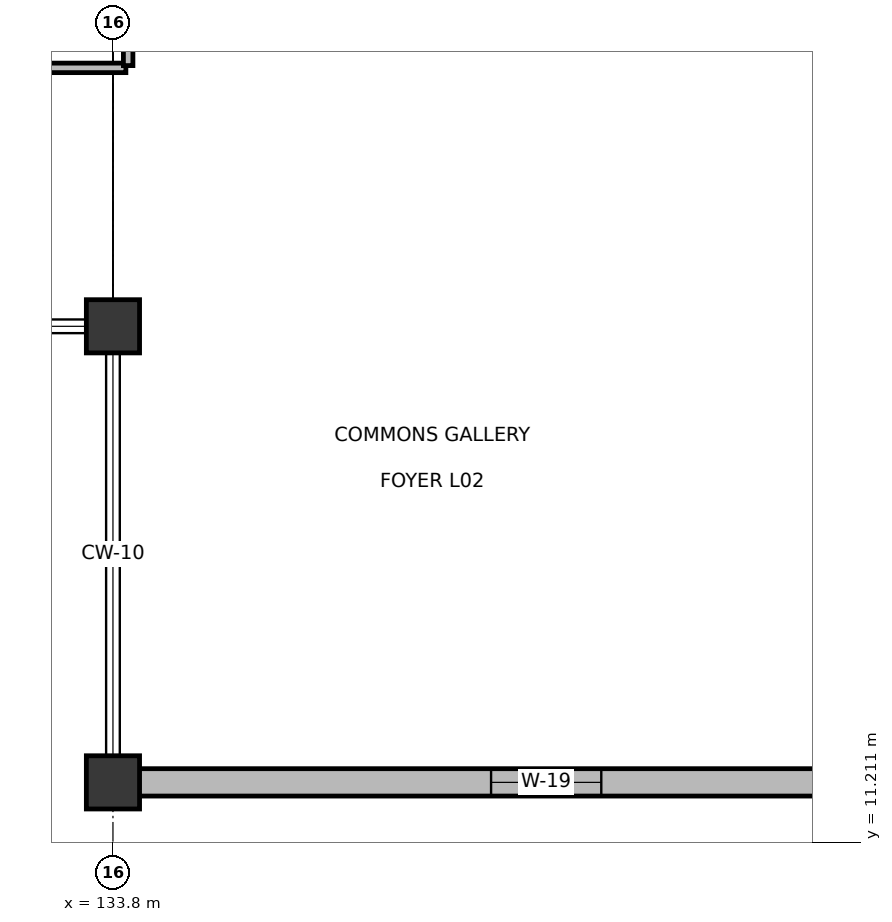
"""IFC4 building model, lengths in metres.
Left out: names, types, materials, properties, quantities, classifications, styles, units other than length and angle.
Written with IfcOpenShell. Run it as: python <this file> out.ifc"""

import sys

from ifc_helpers import new_model, si_unit, direction, frame, frame_2d, origin, origin_2d, place, context, subcontext, project, spatial, rectangle, extrude, element, fill, save


model = new_model("IFC4")
c1 = context("Model", 3, precision=1e-05, world=origin(), true_north=direction((0.0, 1.0)))
c2 = subcontext(c1, "Body", "Model", "MODEL_VIEW")
j1 = project(units=[si_unit("LENGTHUNIT", "METRE"), si_unit("PLANEANGLEUNIT", "RADIAN")], contexts=[c1])
p1 = place(None, origin())
s1 = spatial("IfcSite", under=j1, at=p1, CompositionType="ELEMENT")
p2 = place(p1, origin())
s2 = spatial("IfcBuilding", under=s1, at=p2, CompositionType="ELEMENT")
p3 = place(p2, frame((0.0, 0.0, 10.2)))
s3 = spatial("IfcBuildingStorey", under=s2, at=p3, CompositionType="ELEMENT", Elevation=10.2)
for number, where, z_axis, x_axis in (
    (1, (133.8, 18.0, 0.0), (0.0, 0.0, 1.0), (1.0, 0.0, 0.0)),
    (2, (133.8, 12.0, 0.0), (0.0, 0.0, 1.0), (1.0, 0.0, 0.0)),
):
    element("IfcColumn", number, at=place(p3, frame(where, z_axis=z_axis, x_axis=x_axis)), inside=s3, PredefinedType="COLUMN", context=c2, shape_type="SweptSolid", body=[
        extrude(rectangle(XDim=0.7, YDim=0.7, at=origin_2d()), origin(), (0.0, 0.0, 1.0), 4.8),
    ])
p4 = place(p3, frame((134.135, 12.0, 0.0), z_axis=(0.0, 0.0, 1.0), x_axis=(1.0, 0.0, 0.0)))
e3 = element("IfcWall", 3, at=p4, inside=s3, PredefinedType="SOLIDWALL", context=c2, shape_type="SweptSolid", body=[
    extrude(rectangle(XDim=10.73, YDim=0.36, at=frame_2d((5.365, 0.0))), origin(), (0.0, 0.0, 1.0), 3.595),
])
p5 = place(p4, frame((4.64, 0.0, 0.85)))
e4 = element("IfcOpeningElement", 4, at=p5, cuts=e3, PredefinedType="OPENING", context=c2, shape_type="SweptSolid", body=[
    extrude(rectangle(XDim=1.45, YDim=1.5, at=frame_2d((0.725, 0.75))), frame((0.0, 0.19, 0.0), z_axis=(0.0, -1.0, 0.0), x_axis=(1.0, 0.0, 0.0)), (0.0, 0.0, 1.0), 0.38),
])
p6 = place(p3, frame((119.73, 21.4, 0.0), z_axis=(0.0, 0.0, 1.0), x_axis=(1.0, 0.0, 0.0)))
e5 = element("IfcWall", 5, at=p6, inside=s3, PredefinedType="PARTITIONING", context=c2, shape_type="SweptSolid", body=[
    extrude(rectangle(XDim=14.24, YDim=0.125, at=frame_2d((7.12, 0.0))), origin(), (0.0, 0.0, 1.0), 3.865),
])
p7 = place(p6, frame((6.53, 0.0, 0.0)))
e6 = element("IfcOpeningElement", 6, at=p7, cuts=e5, PredefinedType="OPENING", context=c2, shape_type="SweptSolid", body=[
    extrude(rectangle(XDim=1.18, YDim=2.2, at=frame_2d((0.59, 1.1))), frame((0.0, 0.073, 0.0), z_axis=(0.0, -1.0, 0.0), x_axis=(1.0, 0.0, 0.0)), (0.0, 0.0, 1.0), 0.145),
])
p8 = place(p3, frame((134.0, 21.43, 0.0), z_axis=(0.0, 0.0, 1.0), x_axis=(0.0, 1.0, 0.0)))
e7 = element("IfcWall", 7, at=p8, inside=s3, PredefinedType="PARTITIONING", context=c2, shape_type="SweptSolid", body=[
    extrude(rectangle(XDim=2.54, YDim=0.125, at=frame_2d((1.27, 0.0))), origin(), (0.0, 0.0, 1.0), 3.865),
])
p9 = place(p8, frame((0.41, 0.0, 0.0)))
e8 = element("IfcOpeningElement", 8, at=p9, cuts=e7, PredefinedType="OPENING", context=c2, shape_type="SweptSolid", body=[
    extrude(rectangle(XDim=1.0, YDim=2.15, at=frame_2d((0.5, 1.075))), frame((0.0, 0.073, 0.0), z_axis=(0.0, -1.0, 0.0), x_axis=(1.0, 0.0, 0.0)), (0.0, 0.0, 1.0), 0.145),
])
p10 = place(p5, frame((1.45, 0.0, 0.0), z_axis=(0.0, 0.0, 1.0), x_axis=(-1.0, 0.0, 0.0)))
e9 = element("IfcWindow", 9, at=p10, inside=s3, PartitioningType="SINGLE_PANEL", PredefinedType="WINDOW", context=c2, shape_type="SweptSolid", body=[
    extrude(rectangle(XDim=1.45, YDim=1.5, at=frame_2d((0.725, 0.75))), frame((0.0, 0.03, 0.0), z_axis=(0.0, -1.0, 0.0), x_axis=(1.0, 0.0, 0.0)), (0.0, 0.0, 1.0), 0.06),
])
fill(e4, e9)
save(model, sys.argv[1])
